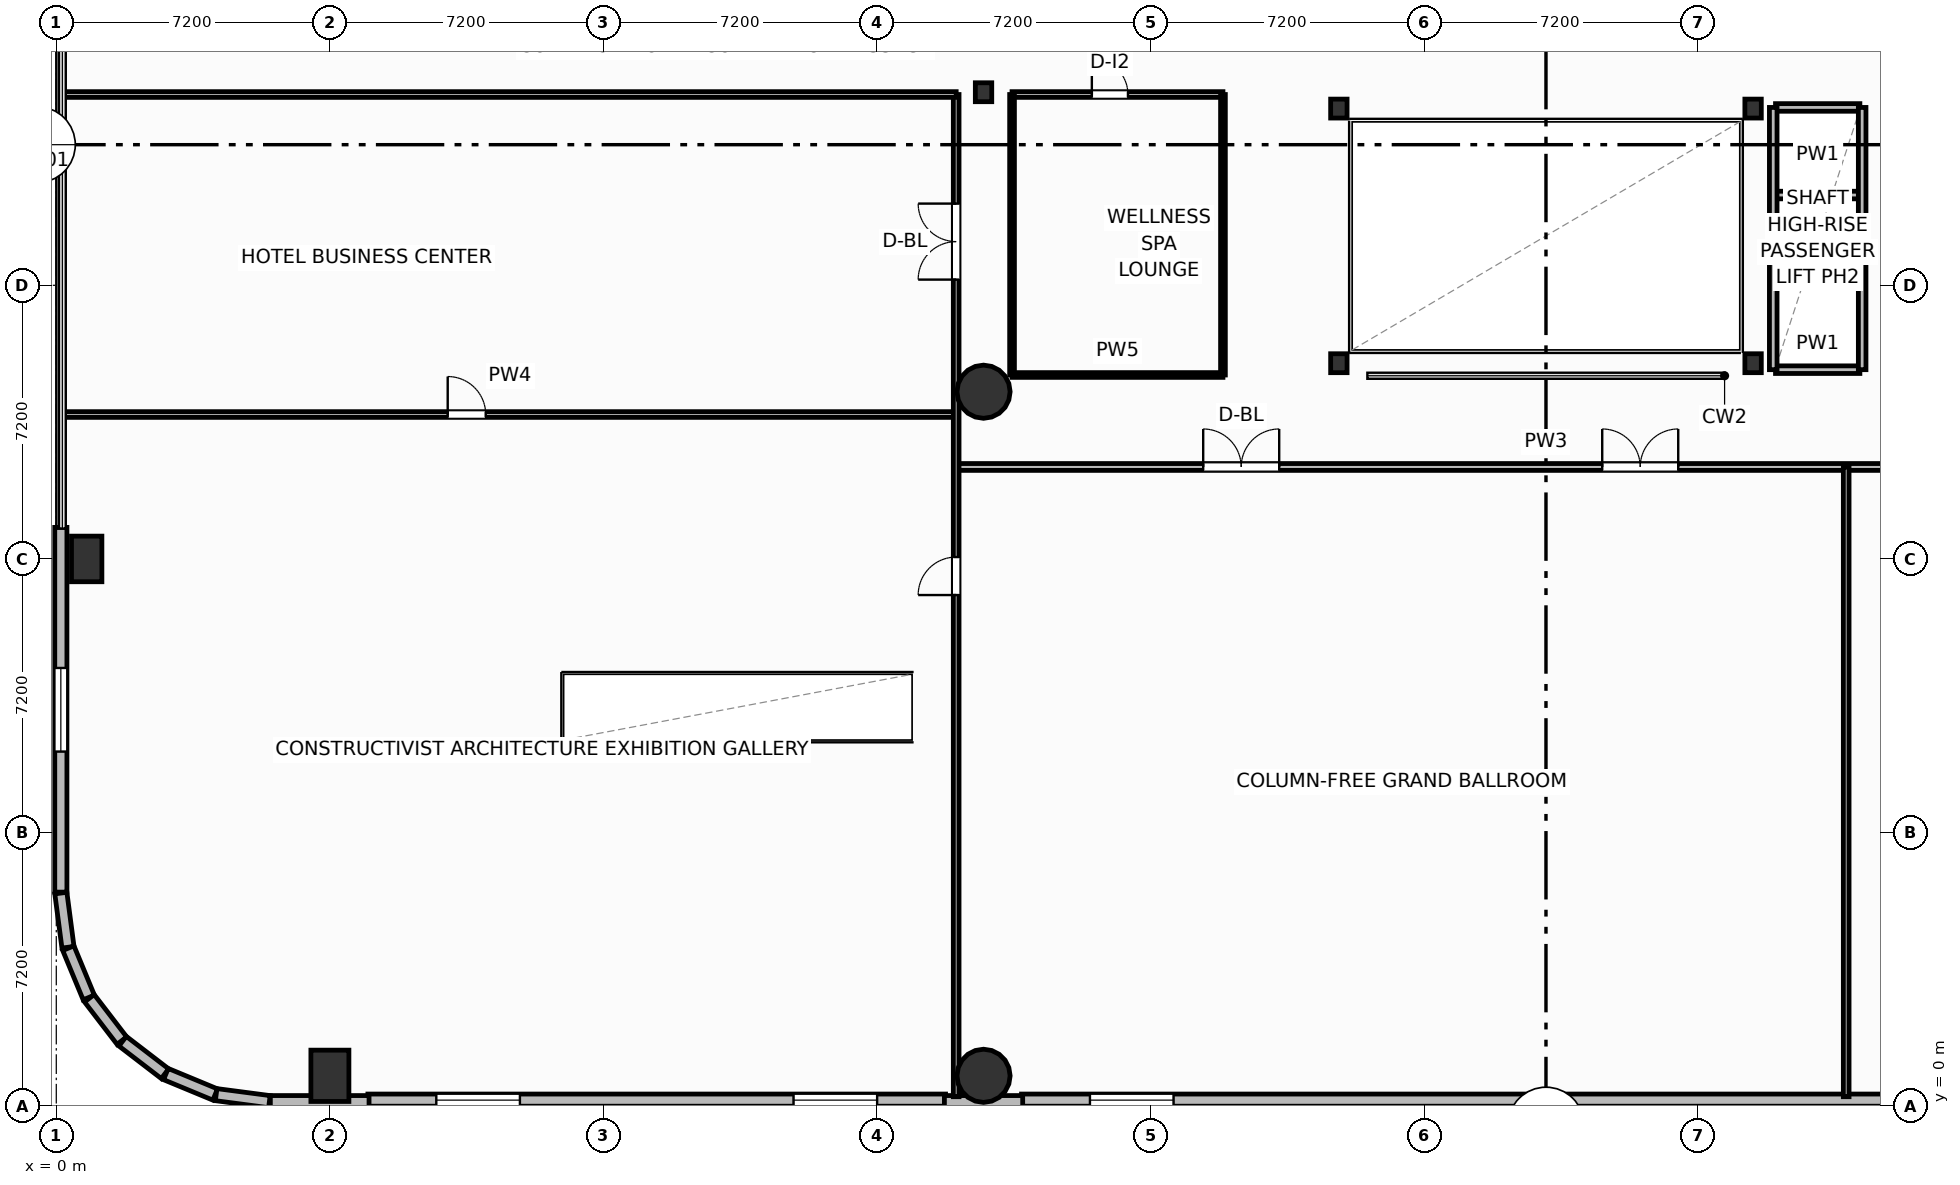
"""IFC4 building model, lengths in metres.
Left out: names, types, materials, properties, quantities, classifications, styles, units other than length and angle.
Written with IfcOpenShell. Run it as: python <this file> out.ifc"""

import sys

from ifc_helpers import new_model, si_unit, direction, frame, frame_2d, origin, origin_2d, place, context, subcontext, project, spatial, rectangle, circle, i_section, extrude, element, fill, save


model = new_model("IFC4")
c1 = context("Model", 3, precision=1e-05, world=origin(), true_north=direction((0.0, 1.0)))
c2 = subcontext(c1, "Body", "Model", "MODEL_VIEW")
j1 = project(units=[si_unit("LENGTHUNIT", "METRE"), si_unit("PLANEANGLEUNIT", "RADIAN")], contexts=[c1])
p1 = place(None, origin())
s1 = spatial("IfcSite", under=j1, at=p1, CompositionType="ELEMENT")
p2 = place(p1, origin())
s2 = spatial("IfcBuilding", under=s1, at=p2, CompositionType="ELEMENT")
p3 = place(p2, frame((0.0, 0.0, 16.2)))
s3 = spatial("IfcBuildingStorey", under=s2, at=p3, CompositionType="ELEMENT", Elevation=16.2)
for number, where, z_axis, x_axis in (
    (1, (33.75, 19.55, 0.0), (0.0, 0.0, 1.0), (1.0, 0.0, 0.0)),
    (2, (44.65, 19.55, 0.0), (0.0, 0.0, 1.0), (1.0, 0.0, 0.0)),
    (3, (33.75, 26.25, 0.0), (0.0, 0.0, 1.0), (1.0, 0.0, 0.0)),
    (4, (44.65, 26.25, 0.0), (0.0, 0.0, 1.0), (1.0, 0.0, 0.0)),
    (5, (24.4, 26.68, 0.0), (0.0, 0.0, 1.0), (1.0, 0.0, 0.0)),
):
    element("IfcColumn", number, at=place(p3, frame(where, z_axis=z_axis, x_axis=x_axis)), inside=s3, PredefinedType="COLUMN", context=c2, shape_type="SweptSolid", body=[
        extrude(i_section(OverallWidth=0.432, OverallDepth=0.498, WebThickness=0.056, FlangeThickness=0.089, FilletRadius=0.025, at=origin_2d()), origin(), (0.0, 0.0, 1.0), 5.4),
    ])
p4 = place(p3, frame((7.2, 0.8, 0.0), z_axis=(0.0, 0.0, 1.0), x_axis=(1.0, 0.0, 0.0)))
e6 = element("IfcColumn", 6, at=p4, inside=s3, PredefinedType="COLUMN", context=c2, shape_type="SweptSolid", body=[
    extrude(rectangle(XDim=1.0, YDim=1.35, at=origin_2d()), origin(), (0.0, 0.0, 1.0), 5.4),
])
for number, where, z_axis, x_axis in (
    (7, (24.4, 0.8, 0.0), (0.0, 0.0, 1.0), (1.0, 0.0, 0.0)),
    (8, (24.4, 18.8, 0.0), (0.0, 0.0, 1.0), (1.0, 0.0, 0.0)),
):
    element("IfcColumn", number, at=place(p3, frame(where, z_axis=z_axis, x_axis=x_axis)), inside=s3, PredefinedType="COLUMN", context=c2, shape_type="SweptSolid", body=[
        extrude(circle(Radius=0.7, at=origin_2d()), origin(), (0.0, 0.0, 1.0), 5.4),
    ])
p5 = place(p3, frame((0.8, 14.4, 0.0), z_axis=(0.0, 0.0, 1.0), x_axis=(1.0, 0.0, 0.0)))
e9 = element("IfcColumn", 9, at=p5, inside=s3, PredefinedType="PILASTER", context=c2, shape_type="SweptSolid", body=[
    extrude(rectangle(XDim=0.8, YDim=1.2, at=origin_2d()), origin(), (0.0, 0.0, 1.0), 5.4),
])
p6 = place(p3, frame((23.4, 0.16, 0.0), z_axis=(0.0, 0.0, 1.0), x_axis=(-1.0, 0.0, 0.0)))
e10 = element("IfcWall", 10, at=p6, inside=s3, PredefinedType="SOLIDWALL", context=c2, shape_type="SweptSolid", body=[
    extrude(rectangle(XDim=15.2, YDim=0.32, at=frame_2d((7.6, 0.0))), origin(), (0.0, 0.0, 1.0), 4.03),
])
p7 = place(p6, frame((1.8, 0.0, 0.8)))
e11 = element("IfcOpeningElement", 11, at=p7, cuts=e10, PredefinedType="OPENING", context=c2, shape_type="SweptSolid", body=[
    extrude(rectangle(XDim=2.2, YDim=1.85, at=frame_2d((1.1, 0.925))), frame((0.0, 0.17, 0.0), z_axis=(0.0, -1.0, 0.0), x_axis=(1.0, 0.0, 0.0)), (0.0, 0.0, 1.0), 0.34),
])
p8 = place(p6, frame((11.2, 0.0, 0.8)))
e12 = element("IfcOpeningElement", 12, at=p8, cuts=e10, PredefinedType="OPENING", context=c2, shape_type="SweptSolid", body=[
    extrude(rectangle(XDim=2.2, YDim=1.85, at=frame_2d((1.1, 0.925))), frame((0.0, 0.17, 0.0), z_axis=(0.0, -1.0, 0.0), x_axis=(1.0, 0.0, 0.0)), (0.0, 0.0, 1.0), 0.34),
])
p9 = place(p3, frame((53.0, 0.16, 0.0), z_axis=(0.0, 0.0, 1.0), x_axis=(-1.0, 0.0, 0.0)))
e13 = element("IfcWall", 13, at=p9, inside=s3, PredefinedType="SOLIDWALL", context=c2, shape_type="SweptSolid", body=[
    extrude(rectangle(XDim=27.6, YDim=0.32, at=frame_2d((13.8, 0.0))), origin(), (0.0, 0.0, 1.0), 4.03),
])
p10 = place(p9, frame((1.8, 0.0, 0.8)))
e14 = element("IfcOpeningElement", 14, at=p10, cuts=e13, PredefinedType="OPENING", context=c2, shape_type="SweptSolid", body=[
    extrude(rectangle(XDim=2.2, YDim=1.85, at=frame_2d((1.1, 0.925))), frame((0.0, 0.17, 0.0), z_axis=(0.0, -1.0, 0.0), x_axis=(1.0, 0.0, 0.0)), (0.0, 0.0, 1.0), 0.34),
])
p11 = place(p9, frame((23.6, 0.0, 0.8)))
e15 = element("IfcOpeningElement", 15, at=p11, cuts=e13, PredefinedType="OPENING", context=c2, shape_type="SweptSolid", body=[
    extrude(rectangle(XDim=2.2, YDim=1.85, at=frame_2d((1.1, 0.925))), frame((0.0, 0.17, 0.0), z_axis=(0.0, -1.0, 0.0), x_axis=(1.0, 0.0, 0.0)), (0.0, 0.0, 1.0), 0.34),
])
p12 = place(p3, frame((0.12, 5.608, 0.0), z_axis=(0.0, 0.0, 1.0), x_axis=(0.130362303307, -0.991466423978, 0.0)))
e16 = element("IfcWall", 16, at=p12, inside=s3, PredefinedType="SOLIDWALL", context=c2, shape_type="SweptSolid", body=[
    extrude(rectangle(XDim=1.438, YDim=0.32, at=frame_2d((0.719, 0.0))), origin(), (0.0, 0.0, 1.0), 4.03),
])
p13 = place(p3, frame((0.317, 4.159, 0.0), z_axis=(0.0, 0.0, 1.0), x_axis=(0.382628033724, -0.923902477434, 0.0)))
e17 = element("IfcWall", 17, at=p13, inside=s3, PredefinedType="SOLIDWALL", context=c2, shape_type="SweptSolid", body=[
    extrude(rectangle(XDim=1.405, YDim=0.32, at=frame_2d((0.703, 0.0))), origin(), (0.0, 0.0, 1.0), 4.03),
])
p14 = place(p3, frame((0.87, 2.841, 0.0), z_axis=(0.0, 0.0, 1.0), x_axis=(0.60871962085, -0.79338541907, 0.0)))
e18 = element("IfcWall", 18, at=p14, inside=s3, PredefinedType="SOLIDWALL", context=c2, shape_type="SweptSolid", body=[
    extrude(rectangle(XDim=1.405, YDim=0.32, at=frame_2d((0.703, 0.0))), origin(), (0.0, 0.0, 1.0), 4.03),
])
for number, where, z_axis, x_axis in (
    (19, (1.746, 1.711, 0.0), (0.0, 0.0, 1.0), (0.793, -0.609, 0.0)),
    (20, (2.884, 0.846, 0.0), (0.0, 0.0, 1.0), (0.924, -0.383, 0.0)),
):
    element("IfcWall", number, at=place(p3, frame(where, z_axis=z_axis, x_axis=x_axis)), inside=s3, PredefinedType="SOLIDWALL", context=c2, shape_type="SweptSolid", body=[
        extrude(rectangle(XDim=1.406, YDim=0.32, at=frame_2d((0.703, 0.0))), origin(), (0.0, 0.0, 1.0), 4.03),
    ])
p15 = place(p3, frame((4.207, 0.304, 0.0), z_axis=(0.0, 0.0, 1.0), x_axis=(0.991457235349, -0.130432168094, 0.0)))
e21 = element("IfcWall", 21, at=p15, inside=s3, PredefinedType="SOLIDWALL", context=c2, shape_type="SweptSolid", body=[
    extrude(rectangle(XDim=1.413, YDim=0.32, at=frame_2d((0.707, 0.0))), origin(), (0.0, 0.0, 1.0), 4.03),
])
p16 = place(p3, frame((5.633, 0.12, 0.0), z_axis=(0.0, 0.0, 1.0), x_axis=(1.0, 0.0, 0.0)))
e22 = element("IfcWall", 22, at=p16, inside=s3, PredefinedType="SOLIDWALL", context=c2, shape_type="SweptSolid", body=[
    extrude(rectangle(XDim=2.597, YDim=0.32, at=frame_2d((1.299, 0.0))), origin(), (0.0, 0.0, 1.0), 4.03),
])
p17 = place(p3, frame((23.37, 0.12, 0.0), z_axis=(0.0, 0.0, 1.0), x_axis=(1.0, 0.0, 0.0)))
e23 = element("IfcWall", 23, at=p17, inside=s3, PredefinedType="SOLIDWALL", context=c2, shape_type="SweptSolid", body=[
    extrude(rectangle(XDim=2.06, YDim=0.32, at=frame_2d((1.03, 0.0))), origin(), (0.0, 0.0, 1.0), 4.03),
])
p18 = place(p3, frame((0.12, 15.23, 0.0), z_axis=(0.0, 0.0, 1.0), x_axis=(0.0, -1.0, 0.0)))
e24 = element("IfcWall", 24, at=p18, inside=s3, PredefinedType="SOLIDWALL", context=c2, shape_type="SweptSolid", body=[
    extrude(rectangle(XDim=9.597, YDim=0.32, at=frame_2d((4.799, 0.0))), origin(), (0.0, 0.0, 1.0), 4.03),
])
p19 = place(p18, frame((3.698, 0.0, 0.8)))
e25 = element("IfcOpeningElement", 25, at=p19, cuts=e24, PredefinedType="OPENING", context=c2, shape_type="SweptSolid", body=[
    extrude(rectangle(XDim=2.2, YDim=2.0, at=frame_2d((1.1, 1.0))), frame((0.0, 0.17, 0.0), z_axis=(0.0, -1.0, 0.0), x_axis=(1.0, 0.0, 0.0)), (0.0, 0.0, 1.0), 0.34),
])
p20 = place(p3, frame((0.2, 18.2, 0.0), z_axis=(0.0, 0.0, 1.0), x_axis=(1.0, 0.0, 0.0)))
e26 = element("IfcWall", 26, at=p20, inside=s3, PredefinedType="PARTITIONING", context=c2, shape_type="SweptSolid", body=[
    extrude(rectangle(XDim=23.48, YDim=0.15, at=frame_2d((11.74, 0.0))), origin(), (0.0, 0.0, 1.0), 4.045),
])
p21 = place(p20, frame((10.1, 0.0, 0.0)))
e27 = element("IfcOpeningElement", 27, at=p21, cuts=e26, PredefinedType="OPENING", context=c2, shape_type="SweptSolid", body=[
    extrude(rectangle(XDim=1.0, YDim=2.05, at=frame_2d((0.5, 1.025))), frame((0.0, 0.085, 0.0), z_axis=(0.0, -1.0, 0.0), x_axis=(1.0, 0.0, 0.0)), (0.0, 0.0, 1.0), 0.17),
])
p22 = place(p3, frame((23.68, 16.82, 0.0), z_axis=(0.0, 0.0, 1.0), x_axis=(1.0, 0.0, 0.0)))
e28 = element("IfcWall", 28, at=p22, inside=s3, PredefinedType="PARTITIONING", context=c2, shape_type="SweptSolid", body=[
    extrude(rectangle(XDim=31.04, YDim=0.18, at=frame_2d((15.52, 0.0))), origin(), (0.0, 0.0, 1.0), 5.08),
])
p23 = place(p22, frame((6.5, 0.0, 0.0)))
e29 = element("IfcOpeningElement", 29, at=p23, cuts=e28, PredefinedType="OPENING", context=c2, shape_type="SweptSolid", body=[
    extrude(rectangle(XDim=2.0, YDim=2.05, at=frame_2d((1.0, 1.025))), frame((0.0, 0.1, 0.0), z_axis=(0.0, -1.0, 0.0), x_axis=(1.0, 0.0, 0.0)), (0.0, 0.0, 1.0), 0.2),
])
p24 = place(p22, frame((17.0, 0.0, 0.0)))
e30 = element("IfcOpeningElement", 30, at=p24, cuts=e28, PredefinedType="OPENING", context=c2, shape_type="SweptSolid", body=[
    extrude(rectangle(XDim=2.0, YDim=2.05, at=frame_2d((1.0, 1.025))), frame((0.0, 0.1, 0.0), z_axis=(0.0, -1.0, 0.0), x_axis=(1.0, 0.0, 0.0)), (0.0, 0.0, 1.0), 0.2),
])
p25 = place(p22, frame((25.8, 0.0, 0.0)))
e31 = element("IfcOpeningElement", 31, at=p25, cuts=e28, PredefinedType="OPENING", context=c2, shape_type="SweptSolid", body=[
    extrude(rectangle(XDim=1.0, YDim=2.05, at=frame_2d((0.5, 1.025))), frame((0.0, 0.1, 0.0), z_axis=(0.0, -1.0, 0.0), x_axis=(1.0, 0.0, 0.0)), (0.0, 0.0, 1.0), 0.2),
])
p26 = place(p3, frame((47.1, 0.25, 0.0), z_axis=(0.0, 0.0, 1.0), x_axis=(0.0, 1.0, 0.0)))
e32 = element("IfcWall", 32, at=p26, inside=s3, PredefinedType="PARTITIONING", context=c2, shape_type="SweptSolid", body=[
    extrude(rectangle(XDim=16.57, YDim=0.15, at=frame_2d((8.285, 0.0))), origin(), (0.0, 0.0, 1.0), 5.08),
])
p27 = place(p3, frame((23.68, 0.25, 0.0), z_axis=(0.0, 0.0, 1.0), x_axis=(0.0, 1.0, 0.0)))
e33 = element("IfcWall", 33, at=p27, inside=s3, PredefinedType="PARTITIONING", context=c2, shape_type="SweptSolid", body=[
    extrude(rectangle(XDim=26.37, YDim=0.15, at=frame_2d((13.185, 0.0))), origin(), (0.0, 0.0, 1.0), 5.08),
])
p28 = place(p27, frame((13.2, 0.0, 0.0)))
e34 = element("IfcOpeningElement", 34, at=p28, cuts=e33, PredefinedType="OPENING", context=c2, shape_type="SweptSolid", body=[
    extrude(rectangle(XDim=1.0, YDim=2.05, at=frame_2d((0.5, 1.025))), frame((0.0, 0.085, 0.0), z_axis=(0.0, -1.0, 0.0), x_axis=(1.0, 0.0, 0.0)), (0.0, 0.0, 1.0), 0.17),
])
p29 = place(p27, frame((21.5, 0.0, 0.0)))
e35 = element("IfcOpeningElement", 35, at=p29, cuts=e33, PredefinedType="OPENING", context=c2, shape_type="SweptSolid", body=[
    extrude(rectangle(XDim=2.0, YDim=2.05, at=frame_2d((1.0, 1.025))), frame((0.0, 0.085, 0.0), z_axis=(0.0, -1.0, 0.0), x_axis=(1.0, 0.0, 0.0)), (0.0, 0.0, 1.0), 0.17),
])
p30 = place(p3, frame((0.2, 26.62, 0.0), z_axis=(0.0, 0.0, 1.0), x_axis=(1.0, 0.0, 0.0)))
e36 = element("IfcWall", 36, at=p30, inside=s3, PredefinedType="PARTITIONING", context=c2, shape_type="SweptSolid", body=[
    extrude(rectangle(XDim=23.48, YDim=0.15, at=frame_2d((11.74, 0.0))), origin(), (0.0, 0.0, 1.0), 5.08),
])
p31 = place(p3, frame((25.15, 26.62, 0.0), z_axis=(0.0, 0.0, 1.0), x_axis=(1.0, 0.0, 0.0)))
e37 = element("IfcWall", 37, at=p31, inside=s3, PredefinedType="PARTITIONING", context=c2, shape_type="SweptSolid", body=[
    extrude(rectangle(XDim=5.55, YDim=0.15, at=frame_2d((2.775, 0.0))), origin(), (0.0, 0.0, 1.0), 4.292),
])
p32 = place(p31, frame((2.1, 0.0, 0.0)))
e38 = element("IfcOpeningElement", 38, at=p32, cuts=e37, PredefinedType="OPENING", context=c2, shape_type="SweptSolid", body=[
    extrude(rectangle(XDim=0.95, YDim=2.05, at=frame_2d((0.475, 1.025))), frame((0.0, 0.085, 0.0), z_axis=(0.0, -1.0, 0.0), x_axis=(1.0, 0.0, 0.0)), (0.0, 0.0, 1.0), 0.17),
])
for number, where, z_axis, x_axis in (
    (39, (25.15, 19.24, 0.0), (0.0, 0.0, 1.0), (0.0, 1.0, 0.0)),
    (40, (30.7, 19.24, 0.0), (0.0, 0.0, 1.0), (0.0, 1.0, 0.0)),
):
    element("IfcWall", number, at=place(p3, frame(where, z_axis=z_axis, x_axis=x_axis)), inside=s3, PredefinedType="PARTITIONING", context=c2, shape_type="SweptSolid", body=[
        extrude(rectangle(XDim=7.38, YDim=0.125, at=frame_2d((3.69, 0.0))), origin(), (0.0, 0.0, 1.0), 5.08),
    ])
p33 = place(p3, frame((25.15, 19.24, 0.0), z_axis=(0.0, 0.0, 1.0), x_axis=(1.0, 0.0, 0.0)))
e41 = element("IfcWall", 41, at=p33, inside=s3, PredefinedType="PARTITIONING", context=c2, shape_type="SweptSolid", body=[
    extrude(rectangle(XDim=5.55, YDim=0.125, at=frame_2d((2.775, 0.0))), origin(), (0.0, 0.0, 1.0), 5.08),
])
for number, where, z_axis, x_axis in (
    (42, (45.24, 21.675, 0.0), (0.0, 0.0, 1.0), (1.0, 0.0, 0.0)),
    (43, (45.24, 23.975, 0.0), (0.0, 0.0, 1.0), (1.0, 0.0, 0.0)),
    (44, (45.24, 19.38, 0.0), (0.0, 0.0, 1.0), (1.0, 0.0, 0.0)),
    (45, (45.24, 26.28, 0.0), (0.0, 0.0, 1.0), (1.0, 0.0, 0.0)),
):
    element("IfcWall", number, at=place(p3, frame(where, z_axis=z_axis, x_axis=x_axis)), inside=s3, PredefinedType="PARTITIONING", context=c2, shape_type="SweptSolid", body=[
        extrude(rectangle(XDim=2.22, YDim=0.2, at=frame_2d((1.11, 0.0))), origin(), (0.0, 0.0, 1.0), 5.08),
    ])
for number, where, z_axis, x_axis in (
    (46, (45.18, 19.38, 0.0), (0.0, 0.0, 1.0), (0.0, 1.0, 0.0)),
    (47, (47.52, 19.38, 0.0), (0.0, 0.0, 1.0), (0.0, 1.0, 0.0)),
):
    element("IfcWall", number, at=place(p3, frame(where, z_axis=z_axis, x_axis=x_axis)), inside=s3, PredefinedType="PARTITIONING", context=c2, shape_type="SweptSolid", body=[
        extrude(rectangle(XDim=6.9, YDim=0.2, at=frame_2d((3.45, 0.0))), origin(), (0.0, 0.0, 1.0), 5.08),
    ])
p34 = place(p7, origin())
e48 = element("IfcWindow", 48, at=p34, inside=s3, PartitioningType="SINGLE_PANEL", PredefinedType="WINDOW", context=c2, shape_type="SweptSolid", body=[
    extrude(rectangle(XDim=2.2, YDim=1.85, at=frame_2d((1.1, 0.925))), frame((0.0, 0.03, 0.0), z_axis=(0.0, -1.0, 0.0), x_axis=(1.0, 0.0, 0.0)), (0.0, 0.0, 1.0), 0.06),
])
fill(e11, e48)
p35 = place(p8, origin())
e49 = element("IfcWindow", 49, at=p35, inside=s3, PartitioningType="SINGLE_PANEL", PredefinedType="WINDOW", context=c2, shape_type="SweptSolid", body=[
    extrude(rectangle(XDim=2.2, YDim=1.85, at=frame_2d((1.1, 0.925))), frame((0.0, 0.03, 0.0), z_axis=(0.0, -1.0, 0.0), x_axis=(1.0, 0.0, 0.0)), (0.0, 0.0, 1.0), 0.06),
])
fill(e12, e49)
p36 = place(p11, origin())
e50 = element("IfcWindow", 50, at=p36, inside=s3, PartitioningType="SINGLE_PANEL", PredefinedType="WINDOW", context=c2, shape_type="SweptSolid", body=[
    extrude(rectangle(XDim=2.2, YDim=1.85, at=frame_2d((1.1, 0.925))), frame((0.0, 0.03, 0.0), z_axis=(0.0, -1.0, 0.0), x_axis=(1.0, 0.0, 0.0)), (0.0, 0.0, 1.0), 0.06),
])
fill(e15, e50)
p37 = place(p19, origin())
e51 = element("IfcWindow", 51, at=p37, inside=s3, PartitioningType="SINGLE_PANEL", PredefinedType="WINDOW", context=c2, shape_type="SweptSolid", body=[
    extrude(rectangle(XDim=2.2, YDim=2.0, at=frame_2d((1.1, 1.0))), frame((0.0, 0.03, 0.0), z_axis=(0.0, -1.0, 0.0), x_axis=(1.0, 0.0, 0.0)), (0.0, 0.0, 1.0), 0.06),
])
fill(e25, e51)
p38 = place(p21, origin())
e52 = element("IfcDoor", 52, at=p38, inside=s3, OperationType="SINGLE_SWING_LEFT", PredefinedType="DOOR", context=c2, shape_type="SweptSolid", body=[
    extrude(rectangle(XDim=1.0, YDim=2.05, at=frame_2d((0.5, 1.025))), frame((0.0, 0.025, 0.0), z_axis=(0.0, -1.0, 0.0), x_axis=(1.0, 0.0, 0.0)), (0.0, 0.0, 1.0), 0.05),
])
fill(e27, e52)
p39 = place(p23, origin())
e53 = element("IfcDoor", 53, at=p39, inside=s3, OperationType="DOUBLE_DOOR_SINGLE_SWING", PredefinedType="DOOR", context=c2, shape_type="SweptSolid", body=[
    extrude(rectangle(XDim=2.0, YDim=2.05, at=frame_2d((1.0, 1.025))), frame((0.0, 0.025, 0.0), z_axis=(0.0, -1.0, 0.0), x_axis=(1.0, 0.0, 0.0)), (0.0, 0.0, 1.0), 0.05),
])
fill(e29, e53)
p40 = place(p24, origin())
e54 = element("IfcDoor", 54, at=p40, inside=s3, OperationType="DOUBLE_DOOR_SINGLE_SWING", PredefinedType="DOOR", context=c2, shape_type="SweptSolid", body=[
    extrude(rectangle(XDim=2.0, YDim=2.05, at=frame_2d((1.0, 1.025))), frame((0.0, 0.025, 0.0), z_axis=(0.0, -1.0, 0.0), x_axis=(1.0, 0.0, 0.0)), (0.0, 0.0, 1.0), 0.05),
])
fill(e30, e54)
p41 = place(p28, origin())
e55 = element("IfcDoor", 55, at=p41, inside=s3, OperationType="SINGLE_SWING_LEFT", PredefinedType="DOOR", context=c2, shape_type="SweptSolid", body=[
    extrude(rectangle(XDim=1.0, YDim=2.05, at=frame_2d((0.5, 1.025))), frame((0.0, 0.025, 0.0), z_axis=(0.0, -1.0, 0.0), x_axis=(1.0, 0.0, 0.0)), (0.0, 0.0, 1.0), 0.05),
])
fill(e34, e55)
p42 = place(p29, origin())
e56 = element("IfcDoor", 56, at=p42, inside=s3, OperationType="DOUBLE_DOOR_SINGLE_SWING", PredefinedType="DOOR", context=c2, shape_type="SweptSolid", body=[
    extrude(rectangle(XDim=2.0, YDim=2.05, at=frame_2d((1.0, 1.025))), frame((0.0, 0.025, 0.0), z_axis=(0.0, -1.0, 0.0), x_axis=(1.0, 0.0, 0.0)), (0.0, 0.0, 1.0), 0.05),
])
fill(e35, e56)
p43 = place(p32, origin())
e57 = element("IfcDoor", 57, at=p43, inside=s3, OperationType="SINGLE_SWING_LEFT", PredefinedType="DOOR", context=c2, shape_type="SweptSolid", body=[
    extrude(rectangle(XDim=0.95, YDim=2.05, at=frame_2d((0.475, 1.025))), frame((0.0, 0.025, 0.0), z_axis=(0.0, -1.0, 0.0), x_axis=(1.0, 0.0, 0.0)), (0.0, 0.0, 1.0), 0.05),
])
fill(e38, e57)
save(model, sys.argv[1])
